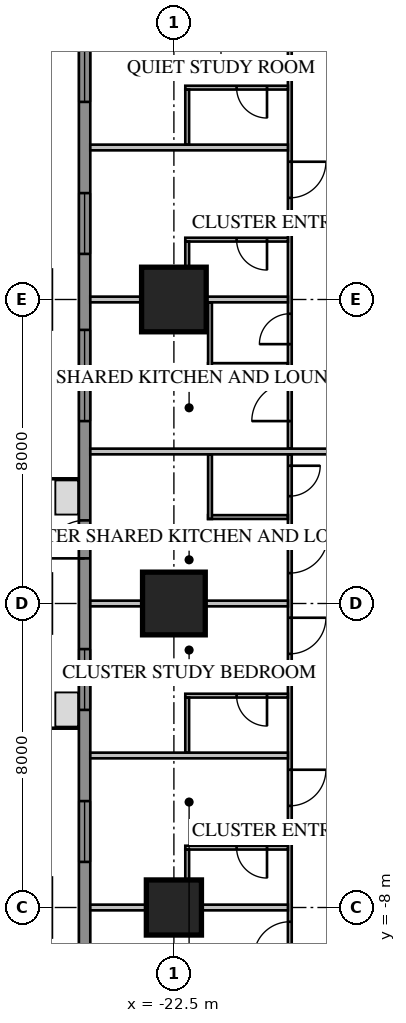
"""IFC4 building model, lengths in metres.
Left out: names, types, materials, properties, quantities, classifications, styles, units other than length and angle.
Written with IfcOpenShell. Run it as: python <this file> out.ifc"""

import sys

from ifc_helpers import new_model, si_unit, direction, frame, frame_2d, origin, origin_2d, place, context, subcontext, project, spatial, rectangle, extrude, element, fill, save


model = new_model("IFC4")
c1 = context("Model", 3, precision=1e-05, world=origin(), true_north=direction((0.0, 1.0)))
c2 = subcontext(c1, "Body", "Model", "MODEL_VIEW")
j1 = project(units=[si_unit("LENGTHUNIT", "METRE"), si_unit("PLANEANGLEUNIT", "RADIAN")], contexts=[c1])
p1 = place(None, origin())
s1 = spatial("IfcSite", under=j1, at=p1, CompositionType="ELEMENT")
p2 = place(p1, origin())
s2 = spatial("IfcBuilding", under=s1, at=p2, CompositionType="ELEMENT")
p3 = place(p2, frame((0.0, 0.0, 23.7)))
s3 = spatial("IfcBuildingStorey", under=s2, at=p3, CompositionType="ELEMENT", Elevation=23.7)
p4 = place(p3, frame((-22.5, 8.0, 0.0), z_axis=(0.0, 0.0, 1.0), x_axis=(1.0, 0.0, 0.0)))
e1 = element("IfcColumn", 1, at=p4, inside=s3, PredefinedType="COLUMN", context=c2, shape_type="SweptSolid", body=[
    extrude(rectangle(XDim=1.7, YDim=1.7, at=origin_2d()), origin(), (0.0, 0.0, 1.0), 3.85),
])
p5 = place(p3, frame((-22.5, 0.0, 0.0), z_axis=(0.0, 0.0, 1.0), x_axis=(1.0, 0.0, 0.0)))
e2 = element("IfcColumn", 2, at=p5, inside=s3, PredefinedType="COLUMN", context=c2, shape_type="SweptSolid", body=[
    extrude(rectangle(XDim=1.65, YDim=1.65, at=origin_2d()), origin(), (0.0, 0.0, 1.0), 3.85),
])
p6 = place(p3, frame((-22.5, -8.0, 0.0), z_axis=(0.0, 0.0, 1.0), x_axis=(1.0, 0.0, 0.0)))
e3 = element("IfcColumn", 3, at=p6, inside=s3, PredefinedType="COLUMN", context=c2, shape_type="SweptSolid", body=[
    extrude(rectangle(XDim=1.45, YDim=1.45, at=origin_2d()), origin(), (0.0, 0.0, 1.0), 3.85),
])
p7 = place(p3, frame((-24.85, 16.0, 0.0), z_axis=(0.0, 0.0, 1.0), x_axis=(0.0, -1.0, 0.0)))
e4 = element("IfcWall", 4, at=p7, inside=s3, PredefinedType="SOLIDWALL", context=c2, shape_type="SweptSolid", body=[
    extrude(rectangle(XDim=32.0, YDim=0.3, at=frame_2d((16.0, 0.0))), origin(), (0.0, 0.0, 1.0), 3.65),
])
p8 = place(p7, frame((1.2, 0.0, 0.75)))
e5 = element("IfcOpeningElement", 5, at=p8, cuts=e4, PredefinedType="OPENING", context=c2, shape_type="SweptSolid", body=[
    extrude(rectangle(XDim=1.6, YDim=1.8, at=frame_2d((0.8, 0.9))), frame((0.0, 0.17, 0.0), z_axis=(0.0, -1.0, 0.0), x_axis=(1.0, 0.0, 0.0)), (0.0, 0.0, 1.0), 0.34),
])
p9 = place(p7, frame((5.2, 0.0, 0.75)))
e6 = element("IfcOpeningElement", 6, at=p9, cuts=e4, PredefinedType="OPENING", context=c2, shape_type="SweptSolid", body=[
    extrude(rectangle(XDim=1.6, YDim=1.8, at=frame_2d((0.8, 0.9))), frame((0.0, 0.17, 0.0), z_axis=(0.0, -1.0, 0.0), x_axis=(1.0, 0.0, 0.0)), (0.0, 0.0, 1.0), 0.34),
])
p10 = place(p7, frame((17.2, 0.0, 0.75)))
e7 = element("IfcOpeningElement", 7, at=p10, cuts=e4, PredefinedType="OPENING", context=c2, shape_type="SweptSolid", body=[
    extrude(rectangle(XDim=1.6, YDim=1.8, at=frame_2d((0.8, 0.9))), frame((0.0, 0.17, 0.0), z_axis=(0.0, -1.0, 0.0), x_axis=(1.0, 0.0, 0.0)), (0.0, 0.0, 1.0), 0.34),
])
p11 = place(p7, frame((21.2, 0.0, 0.75)))
e8 = element("IfcOpeningElement", 8, at=p11, cuts=e4, PredefinedType="OPENING", context=c2, shape_type="SweptSolid", body=[
    extrude(rectangle(XDim=1.6, YDim=1.8, at=frame_2d((0.8, 0.9))), frame((0.0, 0.17, 0.0), z_axis=(0.0, -1.0, 0.0), x_axis=(1.0, 0.0, 0.0)), (0.0, 0.0, 1.0), 0.34),
])
p12 = place(p7, frame((25.2, 0.0, 0.75)))
e9 = element("IfcOpeningElement", 9, at=p12, cuts=e4, PredefinedType="OPENING", context=c2, shape_type="SweptSolid", body=[
    extrude(rectangle(XDim=1.6, YDim=1.8, at=frame_2d((0.8, 0.9))), frame((0.0, 0.17, 0.0), z_axis=(0.0, -1.0, 0.0), x_axis=(1.0, 0.0, 0.0)), (0.0, 0.0, 1.0), 0.34),
])
p13 = place(p7, frame((29.2, 0.0, 0.75)))
e10 = element("IfcOpeningElement", 10, at=p13, cuts=e4, PredefinedType="OPENING", context=c2, shape_type="SweptSolid", body=[
    extrude(rectangle(XDim=1.6, YDim=1.8, at=frame_2d((0.8, 0.9))), frame((0.0, 0.17, 0.0), z_axis=(0.0, -1.0, 0.0), x_axis=(1.0, 0.0, 0.0)), (0.0, 0.0, 1.0), 0.34),
])
p14 = place(p7, frame((8.8, 0.0, 0.75)))
e11 = element("IfcOpeningElement", 11, at=p14, cuts=e4, PredefinedType="OPENING", context=c2, shape_type="SweptSolid", body=[
    extrude(rectangle(XDim=2.4, YDim=1.8, at=frame_2d((1.2, 0.9))), frame((0.0, 0.17, 0.0), z_axis=(0.0, -1.0, 0.0), x_axis=(1.0, 0.0, 0.0)), (0.0, 0.0, 1.0), 0.34),
])
p15 = place(p7, frame((13.812, 0.0, 0.0)))
e12 = element("IfcOpeningElement", 12, at=p15, cuts=e4, PredefinedType="OPENING", context=c2, shape_type="SweptSolid", body=[
    extrude(rectangle(XDim=1.0, YDim=2.4, at=frame_2d((0.5, 1.2))), frame((0.0, 0.17, 0.0), z_axis=(0.0, -1.0, 0.0), x_axis=(1.0, 0.0, 0.0)), (0.0, 0.0, 1.0), 0.34),
])
p16 = place(p3, frame((-19.45, 15.925, 0.0), z_axis=(0.0, 0.0, 1.0), x_axis=(0.0, -1.0, 0.0)))
e13 = element("IfcWall", 13, at=p16, inside=s3, PredefinedType="PARTITIONING", context=c2, shape_type="SweptSolid", body=[
    extrude(rectangle(XDim=11.85, YDim=0.1, at=frame_2d((5.925, 0.0))), origin(), (0.0, 0.0, 1.0), 3.65),
])
p17 = place(p16, frame((10.125, 0.0, 0.0)))
e14 = element("IfcOpeningElement", 14, at=p17, cuts=e13, PredefinedType="OPENING", context=c2, shape_type="SweptSolid", body=[
    extrude(rectangle(XDim=1.0, YDim=2.1, at=frame_2d((0.5, 1.05))), frame((0.0, 0.07, 0.0), z_axis=(0.0, -1.0, 0.0), x_axis=(1.0, 0.0, 0.0)), (0.0, 0.0, 1.0), 0.14),
])
p18 = place(p16, frame((8.3, 0.0, 0.0)))
e15 = element("IfcOpeningElement", 15, at=p18, cuts=e13, PredefinedType="OPENING", context=c2, shape_type="SweptSolid", body=[
    extrude(rectangle(XDim=0.8, YDim=2.1, at=frame_2d((0.4, 1.05))), frame((0.0, 0.07, 0.0), z_axis=(0.0, -1.0, 0.0), x_axis=(1.0, 0.0, 0.0)), (0.0, 0.0, 1.0), 0.14),
])
p19 = place(p16, frame((0.3, 0.0, 0.0)))
e16 = element("IfcOpeningElement", 16, at=p19, cuts=e13, PredefinedType="OPENING", context=c2, shape_type="SweptSolid", body=[
    extrude(rectangle(XDim=0.95, YDim=2.1, at=frame_2d((0.475, 1.05))), frame((0.0, 0.07, 0.0), z_axis=(0.0, -1.0, 0.0), x_axis=(1.0, 0.0, 0.0)), (0.0, 0.0, 1.0), 0.14),
])
p20 = place(p16, frame((4.3, 0.0, 0.0)))
e17 = element("IfcOpeningElement", 17, at=p20, cuts=e13, PredefinedType="OPENING", context=c2, shape_type="SweptSolid", body=[
    extrude(rectangle(XDim=0.95, YDim=2.1, at=frame_2d((0.475, 1.05))), frame((0.0, 0.07, 0.0), z_axis=(0.0, -1.0, 0.0), x_axis=(1.0, 0.0, 0.0)), (0.0, 0.0, 1.0), 0.14),
])
p21 = place(p3, frame((-19.5, 6.275, 0.0), z_axis=(0.0, 0.0, 1.0), x_axis=(-1.0, 0.0, 0.0)))
e18 = element("IfcWall", 18, at=p21, inside=s3, PredefinedType="PARTITIONING", context=c2, shape_type="SweptSolid", body=[
    extrude(rectangle(XDim=2.1, YDim=0.1, at=frame_2d((1.05, 0.0))), origin(), (0.0, 0.0, 1.0), 3.65),
])
p22 = place(p3, frame((-21.55, 7.925, 0.0), z_axis=(0.0, 0.0, 1.0), x_axis=(0.0, -1.0, 0.0)))
e19 = element("IfcWall", 19, at=p22, inside=s3, PredefinedType="PARTITIONING", context=c2, shape_type="SweptSolid", body=[
    extrude(rectangle(XDim=1.7, YDim=0.1, at=frame_2d((0.85, 0.0))), origin(), (0.0, 0.0, 1.0), 3.65),
])
p23 = place(p3, frame((-19.45, 3.925, 0.0), z_axis=(0.0, 0.0, 1.0), x_axis=(0.0, -1.0, 0.0)))
e20 = element("IfcWall", 20, at=p23, inside=s3, PredefinedType="PARTITIONING", context=c2, shape_type="SweptSolid", body=[
    extrude(rectangle(XDim=19.85, YDim=0.1, at=frame_2d((9.925, 0.0))), origin(), (0.0, 0.0, 1.0), 3.65),
])
p24 = place(p23, frame((2.125, 0.0, 0.0)))
e21 = element("IfcOpeningElement", 21, at=p24, cuts=e20, PredefinedType="OPENING", context=c2, shape_type="SweptSolid", body=[
    extrude(rectangle(XDim=1.0, YDim=2.1, at=frame_2d((0.5, 1.05))), frame((0.0, 0.07, 0.0), z_axis=(0.0, -1.0, 0.0), x_axis=(1.0, 0.0, 0.0)), (0.0, 0.0, 1.0), 0.14),
])
p25 = place(p23, frame((0.3, 0.0, 0.0)))
e22 = element("IfcOpeningElement", 22, at=p25, cuts=e20, PredefinedType="OPENING", context=c2, shape_type="SweptSolid", body=[
    extrude(rectangle(XDim=0.8, YDim=2.1, at=frame_2d((0.4, 1.05))), frame((0.0, 0.07, 0.0), z_axis=(0.0, -1.0, 0.0), x_axis=(1.0, 0.0, 0.0)), (0.0, 0.0, 1.0), 0.14),
])
p26 = place(p23, frame((4.3, 0.0, 0.0)))
e23 = element("IfcOpeningElement", 23, at=p26, cuts=e20, PredefinedType="OPENING", context=c2, shape_type="SweptSolid", body=[
    extrude(rectangle(XDim=0.95, YDim=2.1, at=frame_2d((0.475, 1.05))), frame((0.0, 0.07, 0.0), z_axis=(0.0, -1.0, 0.0), x_axis=(1.0, 0.0, 0.0)), (0.0, 0.0, 1.0), 0.14),
])
p27 = place(p23, frame((8.3, 0.0, 0.0)))
e24 = element("IfcOpeningElement", 24, at=p27, cuts=e20, PredefinedType="OPENING", context=c2, shape_type="SweptSolid", body=[
    extrude(rectangle(XDim=0.95, YDim=2.1, at=frame_2d((0.475, 1.05))), frame((0.0, 0.07, 0.0), z_axis=(0.0, -1.0, 0.0), x_axis=(1.0, 0.0, 0.0)), (0.0, 0.0, 1.0), 0.14),
])
p28 = place(p23, frame((12.3, 0.0, 0.0)))
e25 = element("IfcOpeningElement", 25, at=p28, cuts=e20, PredefinedType="OPENING", context=c2, shape_type="SweptSolid", body=[
    extrude(rectangle(XDim=0.95, YDim=2.1, at=frame_2d((0.475, 1.05))), frame((0.0, 0.07, 0.0), z_axis=(0.0, -1.0, 0.0), x_axis=(1.0, 0.0, 0.0)), (0.0, 0.0, 1.0), 0.14),
])
p29 = place(p23, frame((16.3, 0.0, 0.0)))
e26 = element("IfcOpeningElement", 26, at=p29, cuts=e20, PredefinedType="OPENING", context=c2, shape_type="SweptSolid", body=[
    extrude(rectangle(XDim=0.95, YDim=2.1, at=frame_2d((0.475, 1.05))), frame((0.0, 0.07, 0.0), z_axis=(0.0, -1.0, 0.0), x_axis=(1.0, 0.0, 0.0)), (0.0, 0.0, 1.0), 0.14),
])
p30 = place(p3, frame((-19.5, 2.275, 0.0), z_axis=(0.0, 0.0, 1.0), x_axis=(-1.0, 0.0, 0.0)))
e27 = element("IfcWall", 27, at=p30, inside=s3, PredefinedType="PARTITIONING", context=c2, shape_type="SweptSolid", body=[
    extrude(rectangle(XDim=2.1, YDim=0.1, at=frame_2d((1.05, 0.0))), origin(), (0.0, 0.0, 1.0), 3.65),
])
p31 = place(p3, frame((-21.55, 3.925, 0.0), z_axis=(0.0, 0.0, 1.0), x_axis=(0.0, -1.0, 0.0)))
e28 = element("IfcWall", 28, at=p31, inside=s3, PredefinedType="PARTITIONING", context=c2, shape_type="SweptSolid", body=[
    extrude(rectangle(XDim=1.7, YDim=0.1, at=frame_2d((0.85, 0.0))), origin(), (0.0, 0.0, 1.0), 3.65),
])
for number, where, z_axis, x_axis in (
    (29, (-19.5, 12.0, 0.0), (0.0, 0.0, 1.0), (-1.0, 0.0, 0.0)),
    (30, (-19.5, 8.0, 0.0), (0.0, 0.0, 1.0), (-1.0, 0.0, 0.0)),
):
    element("IfcWall", number, at=place(p3, frame(where, z_axis=z_axis, x_axis=x_axis)), inside=s3, PredefinedType="PARTITIONING", context=c2, shape_type="SweptSolid", body=[
        extrude(rectangle(XDim=5.2, YDim=0.15, at=frame_2d((2.6, 0.0))), origin(), (0.0, 0.0, 1.0), 3.65),
    ])
p32 = place(p3, frame((-18.1, 4.0, 0.0), z_axis=(0.0, 0.0, 1.0), x_axis=(-1.0, 0.0, 0.0)))
e31 = element("IfcWall", 31, at=p32, inside=s3, PredefinedType="PARTITIONING", context=c2, shape_type="SweptSolid", body=[
    extrude(rectangle(XDim=6.6, YDim=0.15, at=frame_2d((3.3, 0.0))), origin(), (0.0, 0.0, 1.0), 3.65),
])
p33 = place(p3, frame((-19.5, 0.0, 0.0), z_axis=(0.0, 0.0, 1.0), x_axis=(-1.0, 0.0, 0.0)))
e32 = element("IfcWall", 32, at=p33, inside=s3, PredefinedType="PARTITIONING", context=c2, shape_type="SweptSolid", body=[
    extrude(rectangle(XDim=5.2, YDim=0.15, at=frame_2d((2.6, 0.0))), origin(), (0.0, 0.0, 1.0), 2.957),
])
for number, where, z_axis, x_axis in (
    (33, (-19.5, -4.0, 0.0), (0.0, 0.0, 1.0), (-1.0, 0.0, 0.0)),
    (34, (-19.5, -8.0, 0.0), (0.0, 0.0, 1.0), (-1.0, 0.0, 0.0)),
):
    element("IfcWall", number, at=place(p3, frame(where, z_axis=z_axis, x_axis=x_axis)), inside=s3, PredefinedType="PARTITIONING", context=c2, shape_type="SweptSolid", body=[
        extrude(rectangle(XDim=5.2, YDim=0.15, at=frame_2d((2.6, 0.0))), origin(), (0.0, 0.0, 1.0), 3.65),
    ])
p34 = place(p3, frame((-19.5, 13.575, 0.0), z_axis=(0.0, 0.0, 1.0), x_axis=(-1.0, 0.0, 0.0)))
e35 = element("IfcWall", 35, at=p34, inside=s3, PredefinedType="PARTITIONING", context=c2, shape_type="SweptSolid", body=[
    extrude(rectangle(XDim=2.7, YDim=0.1, at=frame_2d((1.35, 0.0))), origin(), (0.0, 0.0, 1.0), 3.65),
])
p35 = place(p34, frame((0.55, 0.0, 0.0)))
e36 = element("IfcOpeningElement", 36, at=p35, cuts=e35, PredefinedType="OPENING", context=c2, shape_type="SweptSolid", body=[
    extrude(rectangle(XDim=0.8, YDim=2.1, at=frame_2d((0.4, 1.05))), frame((0.0, 0.07, 0.0), z_axis=(0.0, -1.0, 0.0), x_axis=(1.0, 0.0, 0.0)), (0.0, 0.0, 1.0), 0.14),
])
p36 = place(p3, frame((-22.15, 13.525, 0.0), z_axis=(0.0, 0.0, 1.0), x_axis=(0.0, -1.0, 0.0)))
e37 = element("IfcWall", 37, at=p36, inside=s3, PredefinedType="PARTITIONING", context=c2, shape_type="SweptSolid", body=[
    extrude(rectangle(XDim=1.45, YDim=0.1, at=frame_2d((0.725, 0.0))), origin(), (0.0, 0.0, 1.0), 3.65),
])
p37 = place(p3, frame((-19.5, 9.575, 0.0), z_axis=(0.0, 0.0, 1.0), x_axis=(-1.0, 0.0, 0.0)))
e38 = element("IfcWall", 38, at=p37, inside=s3, PredefinedType="PARTITIONING", context=c2, shape_type="SweptSolid", body=[
    extrude(rectangle(XDim=2.7, YDim=0.1, at=frame_2d((1.35, 0.0))), origin(), (0.0, 0.0, 1.0), 3.65),
])
p38 = place(p37, frame((0.55, 0.0, 0.0)))
e39 = element("IfcOpeningElement", 39, at=p38, cuts=e38, PredefinedType="OPENING", context=c2, shape_type="SweptSolid", body=[
    extrude(rectangle(XDim=0.8, YDim=2.1, at=frame_2d((0.4, 1.05))), frame((0.0, 0.07, 0.0), z_axis=(0.0, -1.0, 0.0), x_axis=(1.0, 0.0, 0.0)), (0.0, 0.0, 1.0), 0.14),
])
p39 = place(p3, frame((-22.15, 9.525, 0.0), z_axis=(0.0, 0.0, 1.0), x_axis=(0.0, -1.0, 0.0)))
e40 = element("IfcWall", 40, at=p39, inside=s3, PredefinedType="PARTITIONING", context=c2, shape_type="SweptSolid", body=[
    extrude(rectangle(XDim=1.45, YDim=0.1, at=frame_2d((0.725, 0.0))), origin(), (0.0, 0.0, 1.0), 3.65),
])
p40 = place(p3, frame((-19.5, -2.425, 0.0), z_axis=(0.0, 0.0, 1.0), x_axis=(-1.0, 0.0, 0.0)))
e41 = element("IfcWall", 41, at=p40, inside=s3, PredefinedType="PARTITIONING", context=c2, shape_type="SweptSolid", body=[
    extrude(rectangle(XDim=2.7, YDim=0.1, at=frame_2d((1.35, 0.0))), origin(), (0.0, 0.0, 1.0), 3.65),
])
p41 = place(p40, frame((0.55, 0.0, 0.0)))
e42 = element("IfcOpeningElement", 42, at=p41, cuts=e41, PredefinedType="OPENING", context=c2, shape_type="SweptSolid", body=[
    extrude(rectangle(XDim=0.8, YDim=2.1, at=frame_2d((0.4, 1.05))), frame((0.0, 0.07, 0.0), z_axis=(0.0, -1.0, 0.0), x_axis=(1.0, 0.0, 0.0)), (0.0, 0.0, 1.0), 0.14),
])
p42 = place(p3, frame((-22.15, -2.475, 0.0), z_axis=(0.0, 0.0, 1.0), x_axis=(0.0, -1.0, 0.0)))
e43 = element("IfcWall", 43, at=p42, inside=s3, PredefinedType="PARTITIONING", context=c2, shape_type="SweptSolid", body=[
    extrude(rectangle(XDim=1.45, YDim=0.1, at=frame_2d((0.725, 0.0))), origin(), (0.0, 0.0, 1.0), 3.65),
])
p43 = place(p3, frame((-19.5, -6.425, 0.0), z_axis=(0.0, 0.0, 1.0), x_axis=(-1.0, 0.0, 0.0)))
e44 = element("IfcWall", 44, at=p43, inside=s3, PredefinedType="PARTITIONING", context=c2, shape_type="SweptSolid", body=[
    extrude(rectangle(XDim=2.7, YDim=0.1, at=frame_2d((1.35, 0.0))), origin(), (0.0, 0.0, 1.0), 3.65),
])
p44 = place(p43, frame((0.55, 0.0, 0.0)))
e45 = element("IfcOpeningElement", 45, at=p44, cuts=e44, PredefinedType="OPENING", context=c2, shape_type="SweptSolid", body=[
    extrude(rectangle(XDim=0.8, YDim=2.1, at=frame_2d((0.4, 1.05))), frame((0.0, 0.07, 0.0), z_axis=(0.0, -1.0, 0.0), x_axis=(1.0, 0.0, 0.0)), (0.0, 0.0, 1.0), 0.14),
])
p45 = place(p3, frame((-22.15, -6.475, 0.0), z_axis=(0.0, 0.0, 1.0), x_axis=(0.0, -1.0, 0.0)))
e46 = element("IfcWall", 46, at=p45, inside=s3, PredefinedType="PARTITIONING", context=c2, shape_type="SweptSolid", body=[
    extrude(rectangle(XDim=1.45, YDim=0.1, at=frame_2d((0.725, 0.0))), origin(), (0.0, 0.0, 1.0), 3.65),
])
p46 = place(p8, origin())
e47 = element("IfcWindow", 47, at=p46, inside=s3, PartitioningType="SINGLE_PANEL", PredefinedType="WINDOW", context=c2, shape_type="SweptSolid", body=[
    extrude(rectangle(XDim=1.6, YDim=1.8, at=frame_2d((0.8, 0.9))), frame((0.0, 0.03, 0.0), z_axis=(0.0, -1.0, 0.0), x_axis=(1.0, 0.0, 0.0)), (0.0, 0.0, 1.0), 0.06),
])
fill(e5, e47)
p47 = place(p9, origin())
e48 = element("IfcWindow", 48, at=p47, inside=s3, PartitioningType="SINGLE_PANEL", PredefinedType="WINDOW", context=c2, shape_type="SweptSolid", body=[
    extrude(rectangle(XDim=1.6, YDim=1.8, at=frame_2d((0.8, 0.9))), frame((0.0, 0.03, 0.0), z_axis=(0.0, -1.0, 0.0), x_axis=(1.0, 0.0, 0.0)), (0.0, 0.0, 1.0), 0.06),
])
fill(e6, e48)
p48 = place(p10, origin())
e49 = element("IfcWindow", 49, at=p48, inside=s3, PartitioningType="SINGLE_PANEL", PredefinedType="WINDOW", context=c2, shape_type="SweptSolid", body=[
    extrude(rectangle(XDim=1.6, YDim=1.8, at=frame_2d((0.8, 0.9))), frame((0.0, 0.03, 0.0), z_axis=(0.0, -1.0, 0.0), x_axis=(1.0, 0.0, 0.0)), (0.0, 0.0, 1.0), 0.06),
])
fill(e7, e49)
p49 = place(p11, origin())
e50 = element("IfcWindow", 50, at=p49, inside=s3, PartitioningType="SINGLE_PANEL", PredefinedType="WINDOW", context=c2, shape_type="SweptSolid", body=[
    extrude(rectangle(XDim=1.6, YDim=1.8, at=frame_2d((0.8, 0.9))), frame((0.0, 0.03, 0.0), z_axis=(0.0, -1.0, 0.0), x_axis=(1.0, 0.0, 0.0)), (0.0, 0.0, 1.0), 0.06),
])
fill(e8, e50)
p50 = place(p14, origin())
e51 = element("IfcWindow", 51, at=p50, inside=s3, PartitioningType="SINGLE_PANEL", PredefinedType="WINDOW", context=c2, shape_type="SweptSolid", body=[
    extrude(rectangle(XDim=2.4, YDim=1.8, at=frame_2d((1.2, 0.9))), frame((0.0, 0.03, 0.0), z_axis=(0.0, -1.0, 0.0), x_axis=(1.0, 0.0, 0.0)), (0.0, 0.0, 1.0), 0.06),
])
fill(e11, e51)
p51 = place(p15, origin())
e52 = element("IfcDoor", 52, at=p51, inside=s3, OperationType="SINGLE_SWING_RIGHT", PredefinedType="DOOR", context=c2, shape_type="SweptSolid", body=[
    extrude(rectangle(XDim=1.0, YDim=2.4, at=frame_2d((0.5, 1.2))), frame((0.0, 0.025, 0.0), z_axis=(0.0, -1.0, 0.0), x_axis=(1.0, 0.0, 0.0)), (0.0, 0.0, 1.0), 0.05),
])
fill(e12, e52)
p52 = place(p17, origin())
e53 = element("IfcDoor", 53, at=p52, inside=s3, OperationType="SINGLE_SWING_RIGHT", PredefinedType="DOOR", context=c2, shape_type="SweptSolid", body=[
    extrude(rectangle(XDim=1.0, YDim=2.1, at=frame_2d((0.5, 1.05))), frame((0.0, 0.025, 0.0), z_axis=(0.0, -1.0, 0.0), x_axis=(1.0, 0.0, 0.0)), (0.0, 0.0, 1.0), 0.05),
])
fill(e14, e53)
p53 = place(p18, origin())
e54 = element("IfcDoor", 54, at=p53, inside=s3, OperationType="SINGLE_SWING_RIGHT", PredefinedType="DOOR", context=c2, shape_type="SweptSolid", body=[
    extrude(rectangle(XDim=0.8, YDim=2.1, at=frame_2d((0.4, 1.05))), frame((0.0, 0.025, 0.0), z_axis=(0.0, -1.0, 0.0), x_axis=(1.0, 0.0, 0.0)), (0.0, 0.0, 1.0), 0.05),
])
fill(e15, e54)
p54 = place(p24, origin())
e55 = element("IfcDoor", 55, at=p54, inside=s3, OperationType="SINGLE_SWING_LEFT", PredefinedType="DOOR", context=c2, shape_type="SweptSolid", body=[
    extrude(rectangle(XDim=1.0, YDim=2.1, at=frame_2d((0.5, 1.05))), frame((0.0, 0.025, 0.0), z_axis=(0.0, -1.0, 0.0), x_axis=(1.0, 0.0, 0.0)), (0.0, 0.0, 1.0), 0.05),
])
fill(e21, e55)
p55 = place(p25, origin())
e56 = element("IfcDoor", 56, at=p55, inside=s3, OperationType="SINGLE_SWING_LEFT", PredefinedType="DOOR", context=c2, shape_type="SweptSolid", body=[
    extrude(rectangle(XDim=0.8, YDim=2.1, at=frame_2d((0.4, 1.05))), frame((0.0, 0.025, 0.0), z_axis=(0.0, -1.0, 0.0), x_axis=(1.0, 0.0, 0.0)), (0.0, 0.0, 1.0), 0.05),
])
fill(e22, e56)
p56 = place(p35, origin())
e57 = element("IfcDoor", 57, at=p56, inside=s3, OperationType="SINGLE_SWING_LEFT", PredefinedType="DOOR", context=c2, shape_type="SweptSolid", body=[
    extrude(rectangle(XDim=0.8, YDim=2.1, at=frame_2d((0.4, 1.05))), frame((0.0, 0.025, 0.0), z_axis=(0.0, -1.0, 0.0), x_axis=(1.0, 0.0, 0.0)), (0.0, 0.0, 1.0), 0.05),
])
fill(e36, e57)
p57 = place(p20, origin())
e58 = element("IfcDoor", 58, at=p57, inside=s3, OperationType="SINGLE_SWING_LEFT", PredefinedType="DOOR", context=c2, shape_type="SweptSolid", body=[
    extrude(rectangle(XDim=0.95, YDim=2.1, at=frame_2d((0.475, 1.05))), frame((0.0, 0.025, 0.0), z_axis=(0.0, -1.0, 0.0), x_axis=(1.0, 0.0, 0.0)), (0.0, 0.0, 1.0), 0.05),
])
fill(e17, e58)
p58 = place(p38, origin())
e59 = element("IfcDoor", 59, at=p58, inside=s3, OperationType="SINGLE_SWING_LEFT", PredefinedType="DOOR", context=c2, shape_type="SweptSolid", body=[
    extrude(rectangle(XDim=0.8, YDim=2.1, at=frame_2d((0.4, 1.05))), frame((0.0, 0.025, 0.0), z_axis=(0.0, -1.0, 0.0), x_axis=(1.0, 0.0, 0.0)), (0.0, 0.0, 1.0), 0.05),
])
fill(e39, e59)
p59 = place(p26, origin())
e60 = element("IfcDoor", 60, at=p59, inside=s3, OperationType="SINGLE_SWING_LEFT", PredefinedType="DOOR", context=c2, shape_type="SweptSolid", body=[
    extrude(rectangle(XDim=0.95, YDim=2.1, at=frame_2d((0.475, 1.05))), frame((0.0, 0.025, 0.0), z_axis=(0.0, -1.0, 0.0), x_axis=(1.0, 0.0, 0.0)), (0.0, 0.0, 1.0), 0.05),
])
fill(e23, e60)
p60 = place(p41, origin())
e61 = element("IfcDoor", 61, at=p60, inside=s3, OperationType="SINGLE_SWING_LEFT", PredefinedType="DOOR", context=c2, shape_type="SweptSolid", body=[
    extrude(rectangle(XDim=0.8, YDim=2.1, at=frame_2d((0.4, 1.05))), frame((0.0, 0.025, 0.0), z_axis=(0.0, -1.0, 0.0), x_axis=(1.0, 0.0, 0.0)), (0.0, 0.0, 1.0), 0.05),
])
fill(e42, e61)
p61 = place(p27, origin())
e62 = element("IfcDoor", 62, at=p61, inside=s3, OperationType="SINGLE_SWING_LEFT", PredefinedType="DOOR", context=c2, shape_type="SweptSolid", body=[
    extrude(rectangle(XDim=0.95, YDim=2.1, at=frame_2d((0.475, 1.05))), frame((0.0, 0.025, 0.0), z_axis=(0.0, -1.0, 0.0), x_axis=(1.0, 0.0, 0.0)), (0.0, 0.0, 1.0), 0.05),
])
fill(e24, e62)
p62 = place(p44, origin())
e63 = element("IfcDoor", 63, at=p62, inside=s3, OperationType="SINGLE_SWING_LEFT", PredefinedType="DOOR", context=c2, shape_type="SweptSolid", body=[
    extrude(rectangle(XDim=0.8, YDim=2.1, at=frame_2d((0.4, 1.05))), frame((0.0, 0.025, 0.0), z_axis=(0.0, -1.0, 0.0), x_axis=(1.0, 0.0, 0.0)), (0.0, 0.0, 1.0), 0.05),
])
fill(e45, e63)
p63 = place(p28, origin())
e64 = element("IfcDoor", 64, at=p63, inside=s3, OperationType="SINGLE_SWING_RIGHT", PredefinedType="DOOR", context=c2, shape_type="SweptSolid", body=[
    extrude(rectangle(XDim=0.95, YDim=2.1, at=frame_2d((0.475, 1.05))), frame((0.0, 0.025, 0.0), z_axis=(0.0, -1.0, 0.0), x_axis=(1.0, 0.0, 0.0)), (0.0, 0.0, 1.0), 0.05),
])
fill(e25, e64)
save(model, sys.argv[1])
